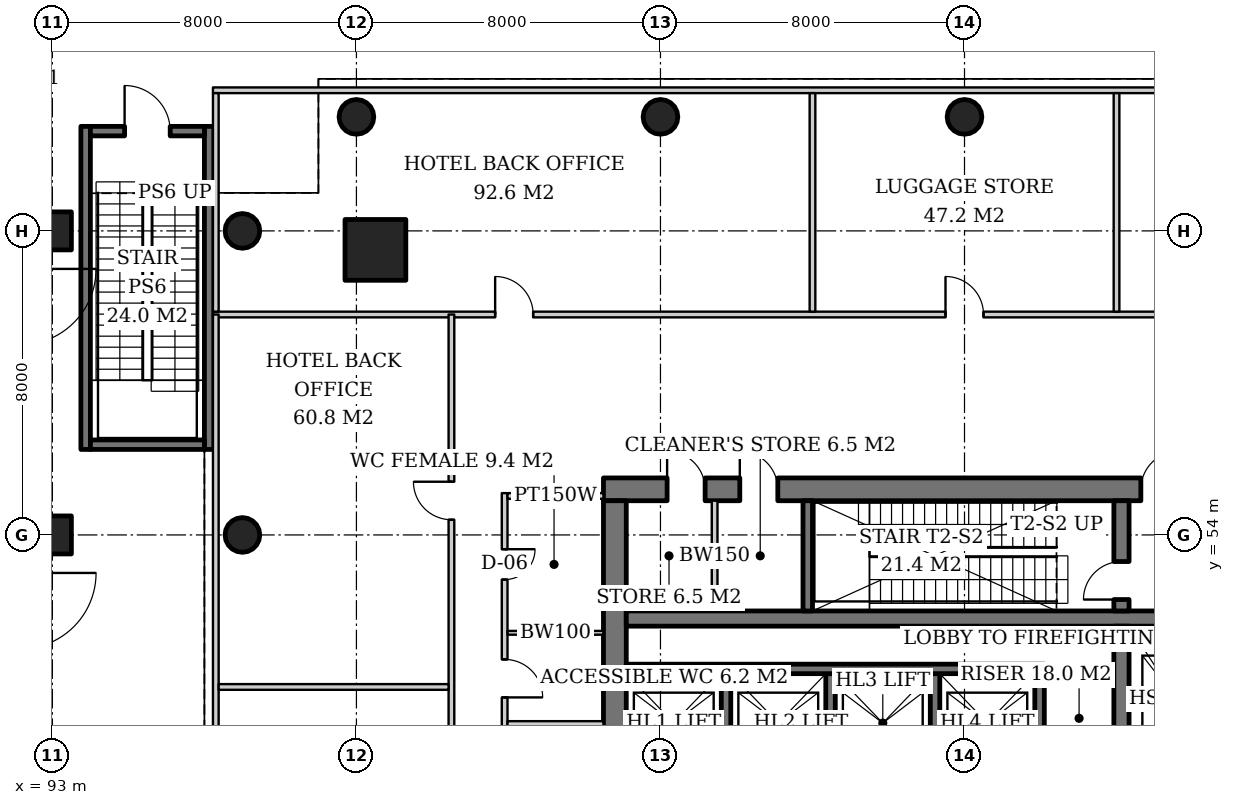
"""IFC4 building model, lengths in metres.
Left out: names, types, materials, properties, quantities, classifications, styles, units other than length and angle.
Written with IfcOpenShell. Run it as: python <this file> out.ifc"""

import sys

from ifc_helpers import new_model, si_unit, direction, frame, frame_2d, origin, origin_2d, place, context, subcontext, project, spatial, rectangle, hollow_circle, extrude, element, fill, save


model = new_model("IFC4")
c1 = context("Model", 3, precision=1e-05, world=origin(), true_north=direction((0.0, 1.0)))
c2 = subcontext(c1, "Body", "Model", "MODEL_VIEW")
j1 = project(units=[si_unit("LENGTHUNIT", "METRE"), si_unit("PLANEANGLEUNIT", "RADIAN")], contexts=[c1])
p1 = place(None, origin())
s1 = spatial("IfcSite", under=j1, at=p1, CompositionType="ELEMENT")
p2 = place(p1, origin())
s2 = spatial("IfcBuilding", under=s1, at=p2, CompositionType="ELEMENT")
p3 = place(p2, origin())
s3 = spatial("IfcBuildingStorey", under=s2, at=p3, CompositionType="ELEMENT", Elevation=0.0)
for number, where, z_axis, x_axis in (
    (1, (93.0, 54.0, 0.0), (0.0, 0.0, 1.0), (1.0, 0.0, 0.0)),
    (2, (93.0, 62.0, 0.0), (0.0, 0.0, 1.0), (1.0, 0.0, 0.0)),
):
    element("IfcColumn", number, at=place(p3, frame(where, z_axis=z_axis, x_axis=x_axis)), inside=s3, PredefinedType="COLUMN", context=c2, shape_type="SweptSolid", body=[
        extrude(rectangle(XDim=1.0, YDim=1.0, at=origin_2d()), origin(), (0.0, 0.0, 1.0), 6.0),
    ])
p4 = place(p3, frame((101.5, 61.5, 0.0), z_axis=(0.0, 0.0, 1.0), x_axis=(1.0, 0.0, 0.0)))
e3 = element("IfcColumn", 3, at=p4, inside=s3, PredefinedType="COLUMN", context=c2, shape_type="SweptSolid", body=[
    extrude(rectangle(XDim=1.6, YDim=1.6, at=origin_2d()), origin(), (0.0, 0.0, 1.0), 6.0),
])
for number, where, z_axis, x_axis in (
    (4, (101.0, 65.0, 0.0), (0.0, 0.0, 1.0), (1.0, 0.0, 0.0)),
    (5, (117.0, 65.0, 0.0), (0.0, 0.0, 1.0), (1.0, 0.0, 0.0)),
    (6, (109.0, 65.0, 0.0), (0.0, 0.0, 1.0), (1.0, 0.0, 0.0)),
    (7, (98.0, 62.0, 0.0), (0.0, 0.0, 1.0), (1.0, 0.0, 0.0)),
    (8, (98.0, 54.0, 0.0), (0.0, 0.0, 1.0), (1.0, 0.0, 0.0)),
):
    element("IfcColumn", number, at=place(p3, frame(where, z_axis=z_axis, x_axis=x_axis)), inside=s3, PredefinedType="COLUMN", context=c2, shape_type="SweptSolid", body=[
        extrude(hollow_circle(Radius=0.457, WallThickness=0.03, at=origin_2d()), origin(), (0.0, 0.0, 1.0), 6.0),
    ])
p5 = place(p3, frame((107.5, 55.2, 0.0), z_axis=(0.0, 0.0, 1.0), x_axis=(1.0, 0.0, 0.0)))
e9 = element("IfcWall", 9, at=p5, inside=s3, PredefinedType="SHEAR", context=c2, shape_type="SweptSolid", body=[
    extrude(rectangle(XDim=19.0, YDim=0.6, at=frame_2d((9.5, 0.0))), origin(), (0.0, 0.0, 1.0), 6.0),
])
p6 = place(p5, frame((14.14, 0.0, 0.0)))
e10 = element("IfcOpeningElement", 10, at=p6, cuts=e9, PredefinedType="OPENING", context=c2, shape_type="SweptSolid", body=[
    extrude(rectangle(XDim=1.0, YDim=2.1, at=frame_2d((0.5, 1.05))), frame((0.0, 0.31, 0.0), z_axis=(0.0, -1.0, 0.0), x_axis=(1.0, 0.0, 0.0)), (0.0, 0.0, 1.0), 0.62),
])
p7 = place(p5, frame((1.675, 0.0, 0.0)))
e11 = element("IfcOpeningElement", 11, at=p7, cuts=e9, PredefinedType="OPENING", context=c2, shape_type="SweptSolid", body=[
    extrude(rectangle(XDim=1.0, YDim=2.1, at=frame_2d((0.5, 1.05))), frame((0.0, 0.31, 0.0), z_axis=(0.0, -1.0, 0.0), x_axis=(1.0, 0.0, 0.0)), (0.0, 0.0, 1.0), 0.62),
])
p8 = place(p5, frame((3.587, 0.0, 0.0)))
e12 = element("IfcOpeningElement", 12, at=p8, cuts=e9, PredefinedType="OPENING", context=c2, shape_type="SweptSolid", body=[
    extrude(rectangle(XDim=1.0, YDim=2.1, at=frame_2d((0.5, 1.05))), frame((0.0, 0.31, 0.0), z_axis=(0.0, -1.0, 0.0), x_axis=(1.0, 0.0, 0.0)), (0.0, 0.0, 1.0), 0.62),
])
p9 = place(p3, frame((107.8, 37.1, 0.0), z_axis=(0.0, 0.0, 1.0), x_axis=(0.0, 1.0, 0.0)))
e13 = element("IfcWall", 13, at=p9, inside=s3, PredefinedType="SHEAR", context=c2, shape_type="SweptSolid", body=[
    extrude(rectangle(XDim=17.8, YDim=0.6, at=frame_2d((8.9, 0.0))), origin(), (0.0, 0.0, 1.0), 6.0),
])
p10 = place(p9, frame((8.0, 0.0, 0.0)))
e14 = element("IfcOpeningElement", 14, at=p10, cuts=e13, PredefinedType="OPENING", context=c2, shape_type="SweptSolid", body=[
    extrude(rectangle(XDim=1.8, YDim=2.4, at=frame_2d((0.9, 1.2))), frame((0.0, 0.31, 0.0), z_axis=(0.0, -1.0, 0.0), x_axis=(1.0, 0.0, 0.0)), (0.0, 0.0, 1.0), 0.62),
])
p11 = place(p3, frame((108.1, 51.8, 0.0), z_axis=(0.0, 0.0, 1.0), x_axis=(1.0, 0.0, 0.0)))
e15 = element("IfcWall", 15, at=p11, inside=s3, PredefinedType="SHEAR", context=c2, shape_type="SweptSolid", body=[
    extrude(rectangle(XDim=17.8, YDim=0.4, at=frame_2d((8.9, 0.0))), origin(), (0.0, 0.0, 1.0), 6.0),
])
p12 = place(p3, frame((121.13, 40.4, 0.0), z_axis=(0.0, 0.0, 1.0), x_axis=(0.0, 1.0, 0.0)))
e16 = element("IfcWall", 16, at=p12, inside=s3, PredefinedType="SHEAR", context=c2, shape_type="SweptSolid", body=[
    extrude(rectangle(XDim=11.2, YDim=0.4, at=frame_2d((5.6, 0.0))), origin(), (0.0, 0.0, 1.0), 6.0),
])
p13 = place(p3, frame((121.13, 52.0, 0.0), z_axis=(0.0, 0.0, 1.0), x_axis=(0.0, 1.0, 0.0)))
e17 = element("IfcWall", 17, at=p13, inside=s3, PredefinedType="SHEAR", context=c2, shape_type="SweptSolid", body=[
    extrude(rectangle(XDim=2.9, YDim=0.4, at=frame_2d((1.45, 0.0))), origin(), (0.0, 0.0, 1.0), 6.0),
])
p14 = place(p13, frame((0.3, 0.0, 0.0)))
e18 = element("IfcOpeningElement", 18, at=p14, cuts=e17, PredefinedType="OPENING", context=c2, shape_type="SweptSolid", body=[
    extrude(rectangle(XDim=1.0, YDim=2.1, at=frame_2d((0.5, 1.05))), frame((0.0, 0.21, 0.0), z_axis=(0.0, -1.0, 0.0), x_axis=(1.0, 0.0, 0.0)), (0.0, 0.0, 1.0), 0.42),
])
p15 = place(p3, frame((112.875, 52.0, 0.0), z_axis=(0.0, 0.0, 1.0), x_axis=(0.0, 1.0, 0.0)))
e19 = element("IfcWall", 19, at=p15, inside=s3, PredefinedType="SHEAR", context=c2, shape_type="SweptSolid", body=[
    extrude(rectangle(XDim=2.9, YDim=0.25, at=frame_2d((1.45, 0.0))), origin(), (0.0, 0.0, 1.0), 6.0),
])
for number, where, z_axis, x_axis in (
    (20, (110.725, 47.75, 0.0), (0.0, 0.0, 1.0), (0.0, 1.0, 0.0)),
    (21, (113.475, 47.75, 0.0), (0.0, 0.0, 1.0), (0.0, 1.0, 0.0)),
    (22, (116.225, 47.75, 0.0), (0.0, 0.0, 1.0), (0.0, 1.0, 0.0)),
    (23, (118.975, 47.75, 0.0), (0.0, 0.0, 1.0), (0.0, 1.0, 0.0)),
):
    element("IfcWall", number, at=place(p3, frame(where, z_axis=z_axis, x_axis=x_axis)), inside=s3, PredefinedType="SHEAR", context=c2, shape_type="SweptSolid", body=[
        extrude(rectangle(XDim=2.6, YDim=0.25, at=frame_2d((1.3, 0.0))), origin(), (0.0, 0.0, 1.0), 6.0),
    ])
p16 = place(p3, frame((108.1, 50.475, 0.0), z_axis=(0.0, 0.0, 1.0), x_axis=(1.0, 0.0, 0.0)))
e24 = element("IfcWall", 24, at=p16, inside=s3, PredefinedType="SHEAR", context=c2, shape_type="SweptSolid", body=[
    extrude(rectangle(XDim=11.0, YDim=0.25, at=frame_2d((5.5, 0.0))), origin(), (0.0, 0.0, 1.0), 6.0),
])
p17 = place(p3, frame((110.425, 52.0, 0.0), z_axis=(0.0, 0.0, 1.0), x_axis=(0.0, 1.0, 0.0)))
e25 = element("IfcWall", 25, at=p17, inside=s3, PredefinedType="SOLIDWALL", context=c2, shape_type="SweptSolid", body=[
    extrude(rectangle(XDim=2.9, YDim=0.15, at=frame_2d((1.45, 0.0))), origin(), (0.0, 0.0, 1.0), 5.7),
])
for number, where, z_axis, x_axis in (
    (26, (93.875, 56.25, 0.0), (0.0, 0.0, 1.0), (0.0, 1.0, 0.0)),
    (27, (97.125, 56.25, 0.0), (0.0, 0.0, 1.0), (0.0, 1.0, 0.0)),
):
    element("IfcWall", number, at=place(p3, frame(where, z_axis=z_axis, x_axis=x_axis)), inside=s3, PredefinedType="SOLIDWALL", context=c2, shape_type="SweptSolid", body=[
        extrude(rectangle(XDim=8.5, YDim=0.25, at=frame_2d((4.25, 0.0))), origin(), (0.0, 0.0, 1.0), 5.7),
    ])
p18 = place(p3, frame((94.0, 56.375, 0.0), z_axis=(0.0, 0.0, 1.0), x_axis=(1.0, 0.0, 0.0)))
e28 = element("IfcWall", 28, at=p18, inside=s3, PredefinedType="SOLIDWALL", context=c2, shape_type="SweptSolid", body=[
    extrude(rectangle(XDim=3.0, YDim=0.25, at=frame_2d((1.5, 0.0))), origin(), (0.0, 0.0, 1.0), 5.7),
])
p19 = place(p3, frame((94.0, 64.625, 0.0), z_axis=(0.0, 0.0, 1.0), x_axis=(1.0, 0.0, 0.0)))
e29 = element("IfcWall", 29, at=p19, inside=s3, PredefinedType="SOLIDWALL", context=c2, shape_type="SweptSolid", body=[
    extrude(rectangle(XDim=3.0, YDim=0.25, at=frame_2d((1.5, 0.0))), origin(), (0.0, 0.0, 1.0), 5.7),
])
p20 = place(p19, frame((0.9, 0.0, 0.0)))
e30 = element("IfcOpeningElement", 30, at=p20, cuts=e29, PredefinedType="OPENING", context=c2, shape_type="SweptSolid", body=[
    extrude(rectangle(XDim=1.2, YDim=2.1, at=frame_2d((0.6, 1.05))), frame((0.0, 0.135, 0.0), z_axis=(0.0, -1.0, 0.0), x_axis=(1.0, 0.0, 0.0)), (0.0, 0.0, 1.0), 0.27),
])
p21 = place(p3, frame((104.9, 55.1, 0.0), z_axis=(0.0, 0.0, 1.0), x_axis=(0.0, -1.0, 0.0)))
e31 = element("IfcWall", 31, at=p21, inside=s3, PredefinedType="PARTITIONING", context=c2, shape_type="SweptSolid", body=[
    extrude(rectangle(XDim=6.15, YDim=0.15, at=frame_2d((3.075, 0.0))), origin(), (0.0, 0.0, 1.0), 4.9),
])
p22 = place(p21, frame((1.475, 0.0, 0.0)))
e32 = element("IfcOpeningElement", 32, at=p22, cuts=e31, PredefinedType="OPENING", context=c2, shape_type="SweptSolid", body=[
    extrude(rectangle(XDim=0.8, YDim=2.1, at=frame_2d((0.4, 1.05))), frame((0.0, 0.085, 0.0), z_axis=(0.0, -1.0, 0.0), x_axis=(1.0, 0.0, 0.0)), (0.0, 0.0, 1.0), 0.17),
])
p23 = place(p21, frame((4.375, 0.0, 0.0)))
e33 = element("IfcOpeningElement", 33, at=p23, cuts=e31, PredefinedType="OPENING", context=c2, shape_type="SweptSolid", body=[
    extrude(rectangle(XDim=1.0, YDim=2.1, at=frame_2d((0.5, 1.05))), frame((0.0, 0.085, 0.0), z_axis=(0.0, -1.0, 0.0), x_axis=(1.0, 0.0, 0.0)), (0.0, 0.0, 1.0), 0.17),
])
p24 = place(p3, frame((104.975, 55.025, 0.0), z_axis=(0.0, 0.0, 1.0), x_axis=(1.0, 0.0, 0.0)))
e34 = element("IfcWall", 34, at=p24, inside=s3, PredefinedType="PARTITIONING", context=c2, shape_type="SweptSolid", body=[
    extrude(rectangle(XDim=2.525, YDim=0.15, at=frame_2d((1.262, 0.0))), origin(), (0.0, 0.0, 1.0), 4.9),
])
p25 = place(p3, frame((104.975, 51.425, 0.0), z_axis=(0.0, 0.0, 1.0), x_axis=(1.0, 0.0, 0.0)))
e35 = element("IfcWall", 35, at=p25, inside=s3, PredefinedType="SOLIDWALL", context=c2, shape_type="SweptSolid", body=[
    extrude(rectangle(XDim=2.525, YDim=0.1, at=frame_2d((1.262, 0.0))), origin(), (0.0, 0.0, 1.0), 5.7),
])
p26 = place(p3, frame((104.975, 49.025, 0.0), z_axis=(0.0, 0.0, 1.0), x_axis=(1.0, 0.0, 0.0)))
e36 = element("IfcWall", 36, at=p26, inside=s3, PredefinedType="PARTITIONING", context=c2, shape_type="SweptSolid", body=[
    extrude(rectangle(XDim=2.525, YDim=0.15, at=frame_2d((1.262, 0.0))), origin(), (0.0, 0.0, 1.0), 5.7),
])
p27 = place(p3, frame((97.225, 59.8, 0.0), z_axis=(0.0, 0.0, 1.0), x_axis=(1.0, 0.0, 0.0)))
e37 = element("IfcWall", 37, at=p27, inside=s3, PredefinedType="PARTITIONING", context=c2, shape_type="SweptSolid", body=[
    extrude(rectangle(XDim=39.55, YDim=0.15, at=frame_2d((19.775, 0.0))), origin(), (0.0, 0.0, 1.0), 4.9),
])
p28 = place(p27, frame((7.425, 0.0, 0.0)))
e38 = element("IfcOpeningElement", 38, at=p28, cuts=e37, PredefinedType="OPENING", context=c2, shape_type="SweptSolid", body=[
    extrude(rectangle(XDim=1.0, YDim=2.1, at=frame_2d((0.5, 1.05))), frame((0.0, 0.085, 0.0), z_axis=(0.0, -1.0, 0.0), x_axis=(1.0, 0.0, 0.0)), (0.0, 0.0, 1.0), 0.17),
])
p29 = place(p27, frame((19.275, 0.0, 0.0)))
e39 = element("IfcOpeningElement", 39, at=p29, cuts=e37, PredefinedType="OPENING", context=c2, shape_type="SweptSolid", body=[
    extrude(rectangle(XDim=1.0, YDim=2.1, at=frame_2d((0.5, 1.05))), frame((0.0, 0.085, 0.0), z_axis=(0.0, -1.0, 0.0), x_axis=(1.0, 0.0, 0.0)), (0.0, 0.0, 1.0), 0.17),
])
p30 = place(p27, frame((31.125, 0.0, 0.0)))
e40 = element("IfcOpeningElement", 40, at=p30, cuts=e37, PredefinedType="OPENING", context=c2, shape_type="SweptSolid", body=[
    extrude(rectangle(XDim=1.0, YDim=2.1, at=frame_2d((0.5, 1.05))), frame((0.0, 0.085, 0.0), z_axis=(0.0, -1.0, 0.0), x_axis=(1.0, 0.0, 0.0)), (0.0, 0.0, 1.0), 0.17),
])
p31 = place(p3, frame((97.225, 65.7, 0.0), z_axis=(0.0, 0.0, 1.0), x_axis=(1.0, 0.0, 0.0)))
e41 = element("IfcWall", 41, at=p31, inside=s3, PredefinedType="PARTITIONING", context=c2, shape_type="SweptSolid", body=[
    extrude(rectangle(XDim=39.55, YDim=0.15, at=frame_2d((19.775, 0.0))), origin(), (0.0, 0.0, 1.0), 5.7),
])
p32 = place(p3, frame((97.3, 59.875, 0.0), z_axis=(0.0, 0.0, 1.0), x_axis=(0.0, 1.0, 0.0)))
e42 = element("IfcWall", 42, at=p32, inside=s3, PredefinedType="PARTITIONING", context=c2, shape_type="SweptSolid", body=[
    extrude(rectangle(XDim=5.75, YDim=0.15, at=frame_2d((2.875, 0.0))), origin(), (0.0, 0.0, 1.0), 5.7),
])
for number, where, z_axis, x_axis in (
    (43, (113.0, 59.875, 0.0), (0.0, 0.0, 1.0), (0.0, 1.0, 0.0)),
    (44, (121.0, 59.875, 0.0), (0.0, 0.0, 1.0), (0.0, 1.0, 0.0)),
):
    element("IfcWall", number, at=place(p3, frame(where, z_axis=z_axis, x_axis=x_axis)), inside=s3, PredefinedType="PARTITIONING", context=c2, shape_type="SweptSolid", body=[
        extrude(rectangle(XDim=5.75, YDim=0.15, at=frame_2d((2.875, 0.0))), origin(), (0.0, 0.0, 1.0), 5.15),
    ])
p33 = place(p3, frame((97.3, 32.2, 0.0), z_axis=(0.0, 0.0, 1.0), x_axis=(0.0, 1.0, 0.0)))
e45 = element("IfcWall", 45, at=p33, inside=s3, PredefinedType="PARTITIONING", context=c2, shape_type="SweptSolid", body=[
    extrude(rectangle(XDim=27.6, YDim=0.15, at=frame_2d((13.8, 0.0))), origin(), (0.0, 0.0, 1.0), 5.7),
])
p34 = place(p3, frame((103.5, 32.2, 0.0), z_axis=(0.0, 0.0, 1.0), x_axis=(0.0, 1.0, 0.0)))
e46 = element("IfcWall", 46, at=p34, inside=s3, PredefinedType="PARTITIONING", context=c2, shape_type="SweptSolid", body=[
    extrude(rectangle(XDim=27.6, YDim=0.15, at=frame_2d((13.8, 0.0))), origin(), (0.0, 0.0, 1.0), 4.9),
])
p35 = place(p34, frame((4.4, 0.0, 0.0)))
e47 = element("IfcOpeningElement", 47, at=p35, cuts=e46, PredefinedType="OPENING", context=c2, shape_type="SweptSolid", body=[
    extrude(rectangle(XDim=1.0, YDim=2.1, at=frame_2d((0.5, 1.05))), frame((0.0, 0.085, 0.0), z_axis=(0.0, -1.0, 0.0), x_axis=(1.0, 0.0, 0.0)), (0.0, 0.0, 1.0), 0.17),
])
p36 = place(p34, frame((13.3, 0.0, 0.0)))
e48 = element("IfcOpeningElement", 48, at=p36, cuts=e46, PredefinedType="OPENING", context=c2, shape_type="SweptSolid", body=[
    extrude(rectangle(XDim=1.0, YDim=2.1, at=frame_2d((0.5, 1.05))), frame((0.0, 0.085, 0.0), z_axis=(0.0, -1.0, 0.0), x_axis=(1.0, 0.0, 0.0)), (0.0, 0.0, 1.0), 0.17),
])
p37 = place(p34, frame((22.2, 0.0, 0.0)))
e49 = element("IfcOpeningElement", 49, at=p37, cuts=e46, PredefinedType="OPENING", context=c2, shape_type="SweptSolid", body=[
    extrude(rectangle(XDim=1.0, YDim=2.1, at=frame_2d((0.5, 1.05))), frame((0.0, 0.085, 0.0), z_axis=(0.0, -1.0, 0.0), x_axis=(1.0, 0.0, 0.0)), (0.0, 0.0, 1.0), 0.17),
])
p38 = place(p3, frame((97.375, 50.0, 0.0), z_axis=(0.0, 0.0, 1.0), x_axis=(1.0, 0.0, 0.0)))
e50 = element("IfcWall", 50, at=p38, inside=s3, PredefinedType="PARTITIONING", context=c2, shape_type="SweptSolid", body=[
    extrude(rectangle(XDim=6.05, YDim=0.15, at=frame_2d((3.025, 0.0))), origin(), (0.0, 0.0, 1.0), 5.15),
])
p39 = place(p14, origin())
e51 = element("IfcDoor", 51, at=p39, inside=s3, OperationType="SINGLE_SWING_LEFT", PredefinedType="DOOR", context=c2, shape_type="SweptSolid", body=[
    extrude(rectangle(XDim=1.0, YDim=2.1, at=frame_2d((0.5, 1.05))), frame((0.0, 0.025, 0.0), z_axis=(0.0, -1.0, 0.0), x_axis=(1.0, 0.0, 0.0)), (0.0, 0.0, 1.0), 0.05),
])
fill(e18, e51)
p40 = place(p6, origin())
e52 = element("IfcDoor", 52, at=p40, inside=s3, OperationType="SINGLE_SWING_RIGHT", PredefinedType="DOOR", context=c2, shape_type="SweptSolid", body=[
    extrude(rectangle(XDim=1.0, YDim=2.1, at=frame_2d((0.5, 1.05))), frame((0.0, 0.025, 0.0), z_axis=(0.0, -1.0, 0.0), x_axis=(1.0, 0.0, 0.0)), (0.0, 0.0, 1.0), 0.05),
])
fill(e10, e52)
p41 = place(p7, origin())
e53 = element("IfcDoor", 53, at=p41, inside=s3, OperationType="SINGLE_SWING_LEFT", PredefinedType="DOOR", context=c2, shape_type="SweptSolid", body=[
    extrude(rectangle(XDim=1.0, YDim=2.1, at=frame_2d((0.5, 1.05))), frame((0.0, -0.24, 0.0), z_axis=(0.0, -1.0, 0.0), x_axis=(1.0, 0.0, 0.0)), (0.0, 0.0, 1.0), 0.05),
])
fill(e11, e53)
p42 = place(p8, origin())
e54 = element("IfcDoor", 54, at=p42, inside=s3, OperationType="SINGLE_SWING_LEFT", PredefinedType="DOOR", context=c2, shape_type="SweptSolid", body=[
    extrude(rectangle(XDim=1.0, YDim=2.1, at=frame_2d((0.5, 1.05))), frame((0.0, -0.24, 0.0), z_axis=(0.0, -1.0, 0.0), x_axis=(1.0, 0.0, 0.0)), (0.0, 0.0, 1.0), 0.05),
])
fill(e12, e54)
p43 = place(p20, origin())
e55 = element("IfcDoor", 55, at=p43, inside=s3, OperationType="SINGLE_SWING_LEFT", PredefinedType="DOOR", context=c2, shape_type="SweptSolid", body=[
    extrude(rectangle(XDim=1.2, YDim=2.1, at=frame_2d((0.6, 1.05))), frame((0.0, 0.025, 0.0), z_axis=(0.0, -1.0, 0.0), x_axis=(1.0, 0.0, 0.0)), (0.0, 0.0, 1.0), 0.05),
])
fill(e30, e55)
p44 = place(p22, origin())
e56 = element("IfcDoor", 56, at=p44, inside=s3, OperationType="SINGLE_SWING_LEFT", PredefinedType="DOOR", context=c2, shape_type="SweptSolid", body=[
    extrude(rectangle(XDim=0.8, YDim=2.1, at=frame_2d((0.4, 1.05))), frame((0.0, 0.025, 0.0), z_axis=(0.0, -1.0, 0.0), x_axis=(1.0, 0.0, 0.0)), (0.0, 0.0, 1.0), 0.05),
])
fill(e32, e56)
p45 = place(p23, origin())
e57 = element("IfcDoor", 57, at=p45, inside=s3, OperationType="SINGLE_SWING_RIGHT", PredefinedType="DOOR", context=c2, shape_type="SweptSolid", body=[
    extrude(rectangle(XDim=1.0, YDim=2.1, at=frame_2d((0.5, 1.05))), frame((0.0, 0.025, 0.0), z_axis=(0.0, -1.0, 0.0), x_axis=(1.0, 0.0, 0.0)), (0.0, 0.0, 1.0), 0.05),
])
fill(e33, e57)
p46 = place(p28, origin())
e58 = element("IfcDoor", 58, at=p46, inside=s3, OperationType="SINGLE_SWING_LEFT", PredefinedType="DOOR", context=c2, shape_type="SweptSolid", body=[
    extrude(rectangle(XDim=1.0, YDim=2.1, at=frame_2d((0.5, 1.05))), frame((0.0, 0.025, 0.0), z_axis=(0.0, -1.0, 0.0), x_axis=(1.0, 0.0, 0.0)), (0.0, 0.0, 1.0), 0.05),
])
fill(e38, e58)
p47 = place(p29, origin())
e59 = element("IfcDoor", 59, at=p47, inside=s3, OperationType="SINGLE_SWING_LEFT", PredefinedType="DOOR", context=c2, shape_type="SweptSolid", body=[
    extrude(rectangle(XDim=1.0, YDim=2.1, at=frame_2d((0.5, 1.05))), frame((0.0, 0.025, 0.0), z_axis=(0.0, -1.0, 0.0), x_axis=(1.0, 0.0, 0.0)), (0.0, 0.0, 1.0), 0.05),
])
fill(e39, e59)
p48 = place(p37, origin())
e60 = element("IfcDoor", 60, at=p48, inside=s3, OperationType="SINGLE_SWING_RIGHT", PredefinedType="DOOR", context=c2, shape_type="SweptSolid", body=[
    extrude(rectangle(XDim=1.0, YDim=2.1, at=frame_2d((0.5, 1.05))), frame((0.0, 0.025, 0.0), z_axis=(0.0, -1.0, 0.0), x_axis=(1.0, 0.0, 0.0)), (0.0, 0.0, 1.0), 0.05),
])
fill(e49, e60)
save(model, sys.argv[1])
